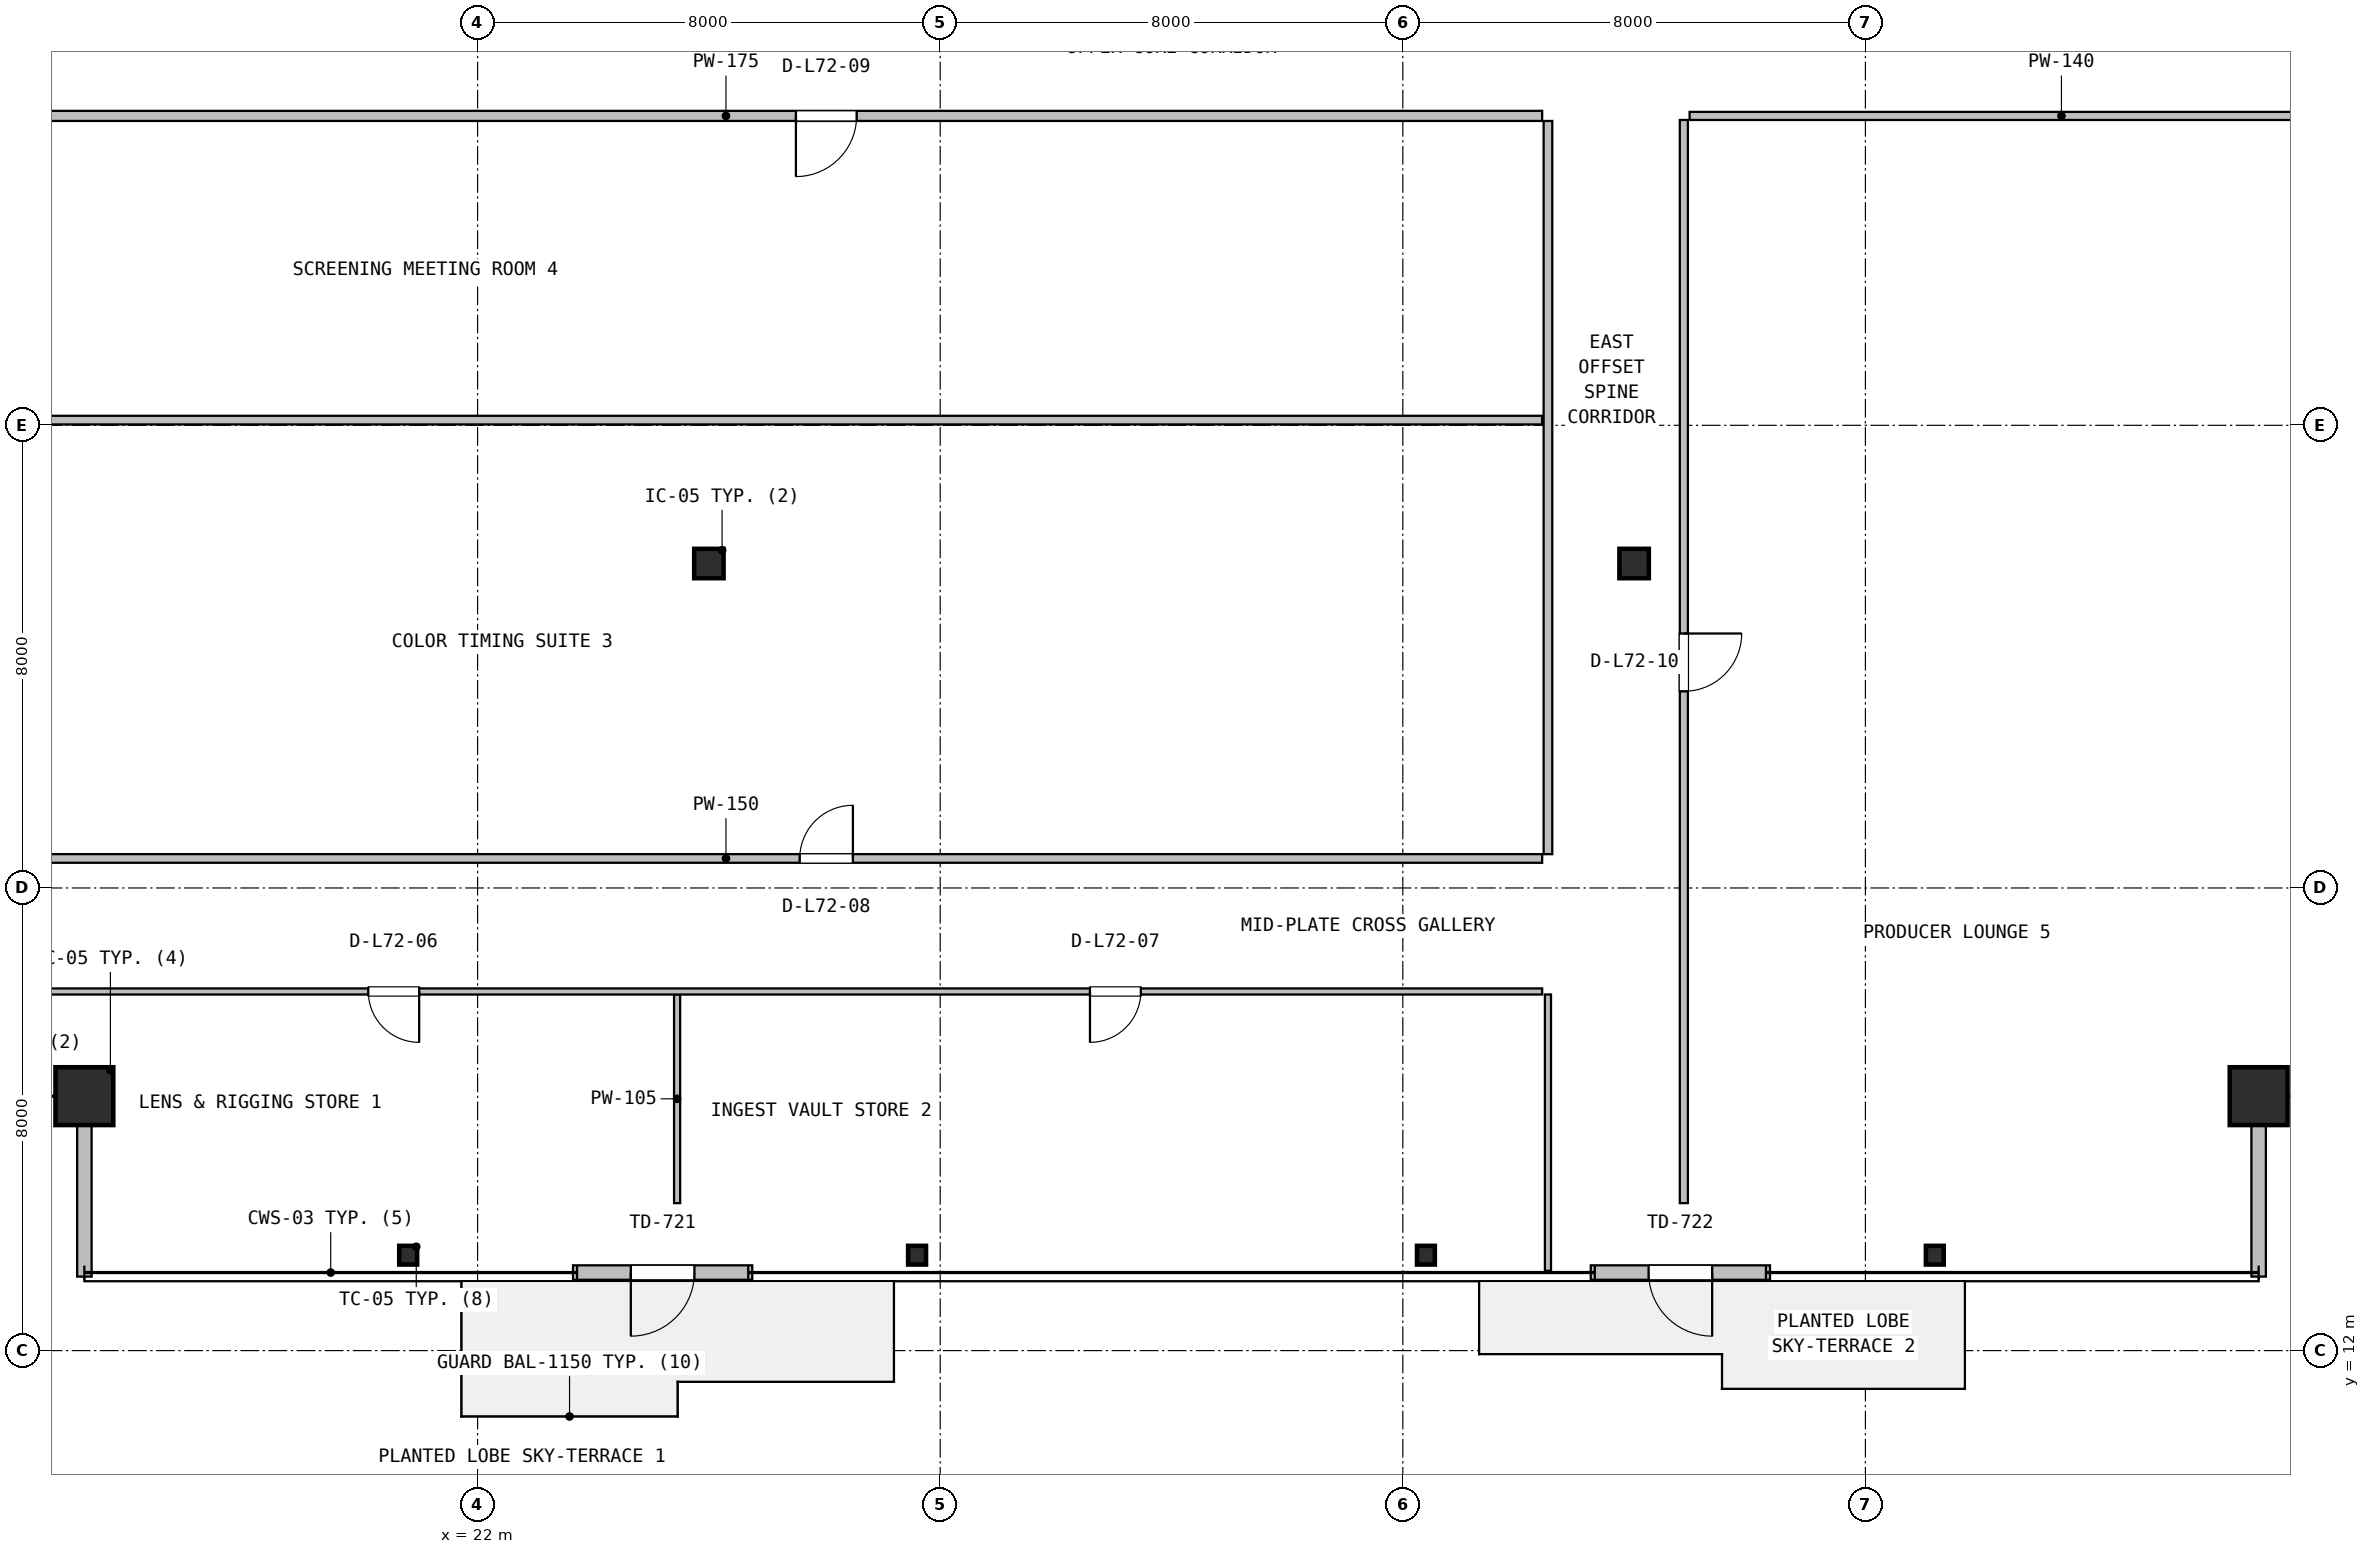
"""IFC4 building model, lengths in metres.
Left out: names, types, materials, properties, quantities, classifications, styles, units other than length and angle.
Written with IfcOpenShell. Run it as: python <this file> out.ifc"""

import sys

from ifc_helpers import new_model, si_unit, direction, frame, frame_2d, origin, origin_2d, place, context, subcontext, project, spatial, rectangle, hollow_rectangle, hollow_circle, i_section, extrude, source, transform, mapped, element, fill, save


model = new_model("IFC4")
c1 = context("Model", 3, precision=1e-05, world=origin(), true_north=direction((0.0, 1.0)))
c2 = subcontext(c1, "Body", "Model", "MODEL_VIEW")
j1 = project(units=[si_unit("LENGTHUNIT", "METRE"), si_unit("PLANEANGLEUNIT", "RADIAN")], contexts=[c1])
p1 = place(None, origin())
s1 = spatial("IfcSite", under=j1, at=p1, CompositionType="ELEMENT")
p2 = place(p1, origin())
s2 = spatial("IfcBuilding", under=s1, at=p2, CompositionType="ELEMENT")
p3 = place(p2, frame((0.0, 0.0, 288.8)))
s3 = spatial("IfcBuildingStorey", under=s2, at=p3, CompositionType="ELEMENT", Elevation=288.8)
m1 = source(origin(), c2, "Body", "SweptSolid", [
    extrude(hollow_rectangle(XDim=1.0, YDim=1.0, WallThickness=0.04, at=origin_2d()), origin(), (0.0, 0.0, 1.0), 3.8),
])
for number, where, z_axis, x_axis in (
    (1, (15.2, 16.4, 0.0), (0.0, 0.0, 1.0), (1.0, 0.0, 0.0)),
    (2, (52.8, 16.4, 0.0), (0.0, 0.0, 1.0), (1.0, 0.0, 0.0)),
):
    element("IfcColumn", number, at=place(p3, frame(where, z_axis=z_axis, x_axis=x_axis)), inside=s3, PredefinedType="COLUMN", context=c2, shape_type="MappedRepresentation", body=[
        mapped(m1, transform((0.0, 0.0, 0.0), x_axis=(1.0, 0.0, 0.0), y_axis=(0.0, 1.0, 0.0), z_axis=(0.0, 0.0, 1.0), scale=1.0)),
    ])
m2 = source(origin(), c2, "Body", "SweptSolid", [
    extrude(i_section(OverallWidth=0.309, OverallDepth=0.323, WebThickness=0.014, FlangeThickness=0.023, FilletRadius=0.015, at=origin_2d()), origin(), (0.0, 0.0, 1.0), 3.8),
])
for number, where, z_axis, x_axis in (
    (3, (20.8, 13.65, 0.0), (0.0, 0.0, 1.0), (1.0, 0.0, 0.0)),
    (4, (29.6, 13.65, 0.0), (0.0, 0.0, 1.0), (1.0, 0.0, 0.0)),
    (5, (38.4, 13.65, 0.0), (0.0, 0.0, 1.0), (1.0, 0.0, 0.0)),
    (6, (47.2, 13.65, 0.0), (0.0, 0.0, 1.0), (1.0, 0.0, 0.0)),
):
    element("IfcColumn", number, at=place(p3, frame(where, z_axis=z_axis, x_axis=x_axis)), inside=s3, PredefinedType="COLUMN", context=c2, shape_type="MappedRepresentation", body=[
        mapped(m2, transform((0.0, 0.0, 0.0), x_axis=(1.0, 0.0, 0.0), y_axis=(0.0, 1.0, 0.0), z_axis=(0.0, 0.0, 1.0), scale=1.0)),
    ])
m3 = source(origin(), c2, "Body", "SweptSolid", [
    extrude(hollow_circle(Radius=0.254, WallThickness=0.02, at=origin_2d()), origin(), (0.0, 0.0, 1.0), 3.8),
])
for number, where, z_axis, x_axis in (
    (7, (26.0, 25.61, 0.0), (0.0, 0.0, 1.0), (1.0, 0.0, 0.0)),
    (8, (42.0, 25.61, 0.0), (0.0, 0.0, 1.0), (1.0, 0.0, 0.0)),
):
    element("IfcColumn", number, at=place(p3, frame(where, z_axis=z_axis, x_axis=x_axis)), inside=s3, PredefinedType="COLUMN", context=c2, shape_type="MappedRepresentation", body=[
        mapped(m3, transform((0.0, 0.0, 0.0), x_axis=(1.0, 0.0, 0.0), y_axis=(0.0, 1.0, 0.0), z_axis=(0.0, 0.0, 1.0), scale=1.0)),
    ])
p4 = place(p3, frame((23.65, 13.35, 0.0), z_axis=(0.0, 0.0, 1.0), x_axis=(1.0, 0.0, 0.0)))
e9 = element("IfcWall", 9, at=p4, inside=s3, PredefinedType="SOLIDWALL", context=c2, shape_type="SweptSolid", body=[
    extrude(rectangle(XDim=3.1, YDim=0.25, at=frame_2d((1.55, 0.0))), origin(), (0.0, 0.0, 1.0), 3.53),
])
p5 = place(p4, frame((1.0, 0.0, 0.0)))
e10 = element("IfcOpeningElement", 10, at=p5, cuts=e9, PredefinedType="OPENING", context=c2, shape_type="SweptSolid", body=[
    extrude(rectangle(XDim=1.1, YDim=2.15, at=frame_2d((0.55, 1.075))), frame((0.0, 0.135, 0.0), z_axis=(0.0, -1.0, 0.0), x_axis=(1.0, 0.0, 0.0)), (0.0, 0.0, 1.0), 0.27),
])
p6 = place(p3, frame((41.25, 13.35, 0.0), z_axis=(0.0, 0.0, 1.0), x_axis=(1.0, 0.0, 0.0)))
e11 = element("IfcWall", 11, at=p6, inside=s3, PredefinedType="SOLIDWALL", context=c2, shape_type="SweptSolid", body=[
    extrude(rectangle(XDim=3.1, YDim=0.25, at=frame_2d((1.55, 0.0))), origin(), (0.0, 0.0, 1.0), 3.53),
])
p7 = place(p6, frame((1.0, 0.0, 0.0)))
e12 = element("IfcOpeningElement", 12, at=p7, cuts=e11, PredefinedType="OPENING", context=c2, shape_type="SweptSolid", body=[
    extrude(rectangle(XDim=1.1, YDim=2.15, at=frame_2d((0.55, 1.075))), frame((0.0, 0.135, 0.0), z_axis=(0.0, -1.0, 0.0), x_axis=(1.0, 0.0, 0.0)), (0.0, 0.0, 1.0), 0.27),
])
for number, where, z_axis, x_axis in (
    (13, (15.2, 13.28, 0.0), (0.0, 0.0, 1.0), (0.0, 1.0, 0.0)),
    (14, (52.8, 13.28, 0.0), (0.0, 0.0, 1.0), (0.0, 1.0, 0.0)),
):
    element("IfcWall", number, at=place(p3, frame(where, z_axis=z_axis, x_axis=x_axis)), inside=s3, PredefinedType="SOLIDWALL", context=c2, shape_type="SweptSolid", body=[
        extrude(rectangle(XDim=3.2, YDim=0.25, at=frame_2d((1.6, 0.0))), origin(), (0.0, 0.0, 1.0), 3.171),
    ])
p8 = place(p3, frame((25.45, 14.55, 0.0), z_axis=(0.0, 0.0, 1.0), x_axis=(0.0, 1.0, 0.0)))
e15 = element("IfcWall", 15, at=p8, inside=s3, PredefinedType="PARTITIONING", context=c2, shape_type="SweptSolid", body=[
    extrude(rectangle(XDim=3.608, YDim=0.105, at=frame_2d((1.804, 0.0))), origin(), (0.0, 0.0, 1.0), 3.278),
])
p9 = place(p3, frame((12.18, 18.21, 0.0), z_axis=(0.0, 0.0, 1.0), x_axis=(1.0, 0.0, 0.0)))
e16 = element("IfcWall", 16, at=p9, inside=s3, PredefinedType="PARTITIONING", context=c2, shape_type="SweptSolid", body=[
    extrude(rectangle(XDim=28.23, YDim=0.105, at=frame_2d((14.115, 0.0))), origin(), (0.0, 0.0, 1.0), 2.981),
])
p10 = place(p9, frame((7.93, 0.0, 0.0)))
e17 = element("IfcOpeningElement", 17, at=p10, cuts=e16, PredefinedType="OPENING", context=c2, shape_type="SweptSolid", body=[
    extrude(rectangle(XDim=0.88, YDim=2.06, at=frame_2d((0.44, 1.03))), frame((0.0, 0.062, 0.0), z_axis=(0.0, -1.0, 0.0), x_axis=(1.0, 0.0, 0.0)), (0.0, 0.0, 1.0), 0.125),
])
p11 = place(p9, frame((20.41, 0.0, 0.0)))
e18 = element("IfcOpeningElement", 18, at=p11, cuts=e16, PredefinedType="OPENING", context=c2, shape_type="SweptSolid", body=[
    extrude(rectangle(XDim=0.88, YDim=2.06, at=frame_2d((0.44, 1.03))), frame((0.0, 0.062, 0.0), z_axis=(0.0, -1.0, 0.0), x_axis=(1.0, 0.0, 0.0)), (0.0, 0.0, 1.0), 0.125),
])
p12 = place(p3, frame((40.51, 13.38, 0.0), z_axis=(0.0, 0.0, 1.0), x_axis=(0.0, 1.0, 0.0)))
e19 = element("IfcWall", 19, at=p12, inside=s3, PredefinedType="PARTITIONING", context=c2, shape_type="SweptSolid", body=[
    extrude(rectangle(XDim=4.778, YDim=0.105, at=frame_2d((2.389, 0.0))), origin(), (0.0, 0.0, 1.0), 3.171),
])
p13 = place(p3, frame((12.18, 20.51, 0.0), z_axis=(0.0, 0.0, 1.0), x_axis=(1.0, 0.0, 0.0)))
e20 = element("IfcWall", 20, at=p13, inside=s3, PredefinedType="PARTITIONING", context=c2, shape_type="SweptSolid", body=[
    extrude(rectangle(XDim=28.23, YDim=0.15, at=frame_2d((14.115, 0.0))), origin(), (0.0, 0.0, 1.0), 2.981),
])
p14 = place(p13, frame((15.39, 0.0, 0.0)))
e21 = element("IfcOpeningElement", 21, at=p14, cuts=e20, PredefinedType="OPENING", context=c2, shape_type="SweptSolid", body=[
    extrude(rectangle(XDim=0.92, YDim=2.08, at=frame_2d((0.46, 1.04))), frame((0.0, 0.085, 0.0), z_axis=(0.0, -1.0, 0.0), x_axis=(1.0, 0.0, 0.0)), (0.0, 0.0, 1.0), 0.17),
])
p15 = place(p3, frame((40.51, 20.585, 0.0), z_axis=(0.0, 0.0, 1.0), x_axis=(0.0, 1.0, 0.0)))
e22 = element("IfcWall", 22, at=p15, inside=s3, PredefinedType="PARTITIONING", context=c2, shape_type="SweptSolid", body=[
    extrude(rectangle(XDim=12.678, YDim=0.15, at=frame_2d((6.339, 0.0))), origin(), (0.0, 0.0, 1.0), 2.981),
])
p16 = place(p3, frame((12.18, 28.09, 0.0), z_axis=(0.0, 0.0, 1.0), x_axis=(1.0, 0.0, 0.0)))
e23 = element("IfcWall", 23, at=p16, inside=s3, PredefinedType="PARTITIONING", context=c2, shape_type="SweptSolid", body=[
    extrude(rectangle(XDim=28.23, YDim=0.15, at=frame_2d((14.115, 0.0))), origin(), (0.0, 0.0, 1.0), 2.981),
])
p17 = place(p3, frame((12.18, 33.35, 0.0), z_axis=(0.0, 0.0, 1.0), x_axis=(1.0, 0.0, 0.0)))
e24 = element("IfcWall", 24, at=p17, inside=s3, PredefinedType="PARTITIONING", context=c2, shape_type="SweptSolid", body=[
    extrude(rectangle(XDim=28.23, YDim=0.175, at=frame_2d((14.115, 0.0))), origin(), (0.0, 0.0, 1.0), 2.981),
])
p18 = place(p17, frame((15.325, 0.0, 0.0)))
e25 = element("IfcOpeningElement", 25, at=p18, cuts=e24, PredefinedType="OPENING", context=c2, shape_type="SweptSolid", body=[
    extrude(rectangle(XDim=1.05, YDim=2.1, at=frame_2d((0.525, 1.05))), frame((0.0, 0.098, 0.0), z_axis=(0.0, -1.0, 0.0), x_axis=(1.0, 0.0, 0.0)), (0.0, 0.0, 1.0), 0.195),
])
p19 = place(p3, frame((42.96, 33.35, 0.0), z_axis=(0.0, 0.0, 1.0), x_axis=(1.0, 0.0, 0.0)))
e26 = element("IfcWall", 26, at=p19, inside=s3, PredefinedType="PARTITIONING", context=c2, shape_type="SweptSolid", body=[
    extrude(rectangle(XDim=12.86, YDim=0.14, at=frame_2d((6.43, 0.0))), origin(), (0.0, 0.0, 1.0), 2.981),
])
p20 = place(p3, frame((42.86, 14.55, 0.0), z_axis=(0.0, 0.0, 1.0), x_axis=(0.0, 1.0, 0.0)))
e27 = element("IfcWall", 27, at=p20, inside=s3, PredefinedType="PARTITIONING", context=c2, shape_type="SweptSolid", body=[
    extrude(rectangle(XDim=18.73, YDim=0.14, at=frame_2d((9.365, 0.0))), origin(), (0.0, 0.0, 1.0), 2.981),
])
p21 = place(p20, frame((8.85, 0.0, 0.0)))
e28 = element("IfcOpeningElement", 28, at=p21, cuts=e27, PredefinedType="OPENING", context=c2, shape_type="SweptSolid", body=[
    extrude(rectangle(XDim=1.0, YDim=2.1, at=frame_2d((0.5, 1.05))), frame((0.0, 0.08, 0.0), z_axis=(0.0, -1.0, 0.0), x_axis=(1.0, 0.0, 0.0)), (0.0, 0.0, 1.0), 0.16),
])
m4 = source(origin(), c2, "Body", "SweptSolid", [
    extrude(rectangle(XDim=1.1, YDim=2.15, at=frame_2d((0.55, 1.075))), frame((0.0, 0.025, 0.0), z_axis=(0.0, -1.0, 0.0), x_axis=(1.0, 0.0, 0.0)), (0.0, 0.0, 1.0), 0.05),
])
p22 = place(p5, frame((1.1, 0.0, 0.0), z_axis=(0.0, 0.0, 1.0), x_axis=(-1.0, 0.0, 0.0)))
e29 = element("IfcDoor", 29, at=p22, inside=s3, OperationType="SINGLE_SWING_LEFT", PredefinedType="DOOR", context=c2, shape_type="MappedRepresentation", body=[
    mapped(m4, transform((0.0, 0.0, 0.0), x_axis=(1.0, 0.0, 0.0), y_axis=(0.0, 1.0, 0.0), z_axis=(0.0, 0.0, 1.0), scale=1.0)),
])
fill(e10, e29)
p23 = place(p7, frame((1.1, 0.0, 0.0), z_axis=(0.0, 0.0, 1.0), x_axis=(-1.0, 0.0, 0.0)))
e30 = element("IfcDoor", 30, at=p23, inside=s3, OperationType="SINGLE_SWING_RIGHT", PredefinedType="DOOR", context=c2, shape_type="MappedRepresentation", body=[
    mapped(m4, transform((0.0, 0.0, 0.0), x_axis=(1.0, 0.0, 0.0), y_axis=(0.0, 1.0, 0.0), z_axis=(0.0, 0.0, 1.0), scale=1.0)),
])
fill(e12, e30)
m5 = source(origin(), c2, "Body", "SweptSolid", [
    extrude(rectangle(XDim=0.88, YDim=2.06, at=frame_2d((0.44, 1.03))), frame((0.0, 0.025, 0.0), z_axis=(0.0, -1.0, 0.0), x_axis=(1.0, 0.0, 0.0)), (0.0, 0.0, 1.0), 0.05),
])
p24 = place(p10, frame((0.88, 0.0, 0.0), z_axis=(0.0, 0.0, 1.0), x_axis=(-1.0, 0.0, 0.0)))
e31 = element("IfcDoor", 31, at=p24, inside=s3, OperationType="SINGLE_SWING_RIGHT", PredefinedType="DOOR", context=c2, shape_type="MappedRepresentation", body=[
    mapped(m5, transform((0.0, 0.0, 0.0), x_axis=(1.0, 0.0, 0.0), y_axis=(0.0, 1.0, 0.0), z_axis=(0.0, 0.0, 1.0), scale=1.0)),
])
fill(e17, e31)
p25 = place(p11, frame((0.88, 0.0, 0.0), z_axis=(0.0, 0.0, 1.0), x_axis=(-1.0, 0.0, 0.0)))
e32 = element("IfcDoor", 32, at=p25, inside=s3, OperationType="SINGLE_SWING_LEFT", PredefinedType="DOOR", context=c2, shape_type="MappedRepresentation", body=[
    mapped(m5, transform((0.0, 0.0, 0.0), x_axis=(1.0, 0.0, 0.0), y_axis=(0.0, 1.0, 0.0), z_axis=(0.0, 0.0, 1.0), scale=1.0)),
])
fill(e18, e32)
m6 = source(origin(), c2, "Body", "SweptSolid", [
    extrude(rectangle(XDim=0.92, YDim=2.08, at=frame_2d((0.46, 1.04))), frame((0.0, 0.025, 0.0), z_axis=(0.0, -1.0, 0.0), x_axis=(1.0, 0.0, 0.0)), (0.0, 0.0, 1.0), 0.05),
])
p26 = place(p14, origin())
e33 = element("IfcDoor", 33, at=p26, inside=s3, OperationType="SINGLE_SWING_RIGHT", PredefinedType="DOOR", context=c2, shape_type="MappedRepresentation", body=[
    mapped(m6, transform((0.0, 0.0, 0.0), x_axis=(1.0, 0.0, 0.0), y_axis=(0.0, 1.0, 0.0), z_axis=(0.0, 0.0, 1.0), scale=1.0)),
])
fill(e21, e33)
m7 = source(origin(), c2, "Body", "SweptSolid", [
    extrude(rectangle(XDim=1.05, YDim=2.1, at=frame_2d((0.525, 1.05))), frame((0.0, 0.025, 0.0), z_axis=(0.0, -1.0, 0.0), x_axis=(1.0, 0.0, 0.0)), (0.0, 0.0, 1.0), 0.05),
])
p27 = place(p18, frame((1.05, 0.0, 0.0), z_axis=(0.0, 0.0, 1.0), x_axis=(-1.0, 0.0, 0.0)))
e34 = element("IfcDoor", 34, at=p27, inside=s3, OperationType="SINGLE_SWING_LEFT", PredefinedType="DOOR", context=c2, shape_type="MappedRepresentation", body=[
    mapped(m7, transform((0.0, 0.0, 0.0), x_axis=(1.0, 0.0, 0.0), y_axis=(0.0, 1.0, 0.0), z_axis=(0.0, 0.0, 1.0), scale=1.0)),
])
fill(e25, e34)
m8 = source(origin(), c2, "Body", "SweptSolid", [
    extrude(rectangle(XDim=1.0, YDim=2.1, at=frame_2d((0.5, 1.05))), frame((0.0, 0.025, 0.0), z_axis=(0.0, -1.0, 0.0), x_axis=(1.0, 0.0, 0.0)), (0.0, 0.0, 1.0), 0.05),
])
p28 = place(p21, frame((1.0, 0.0, 0.0), z_axis=(0.0, 0.0, 1.0), x_axis=(-1.0, 0.0, 0.0)))
e35 = element("IfcDoor", 35, at=p28, inside=s3, OperationType="SINGLE_SWING_RIGHT", PredefinedType="DOOR", context=c2, shape_type="MappedRepresentation", body=[
    mapped(m8, transform((0.0, 0.0, 0.0), x_axis=(1.0, 0.0, 0.0), y_axis=(0.0, 1.0, 0.0), z_axis=(0.0, 0.0, 1.0), scale=1.0)),
])
fill(e28, e35)
save(model, sys.argv[1])
